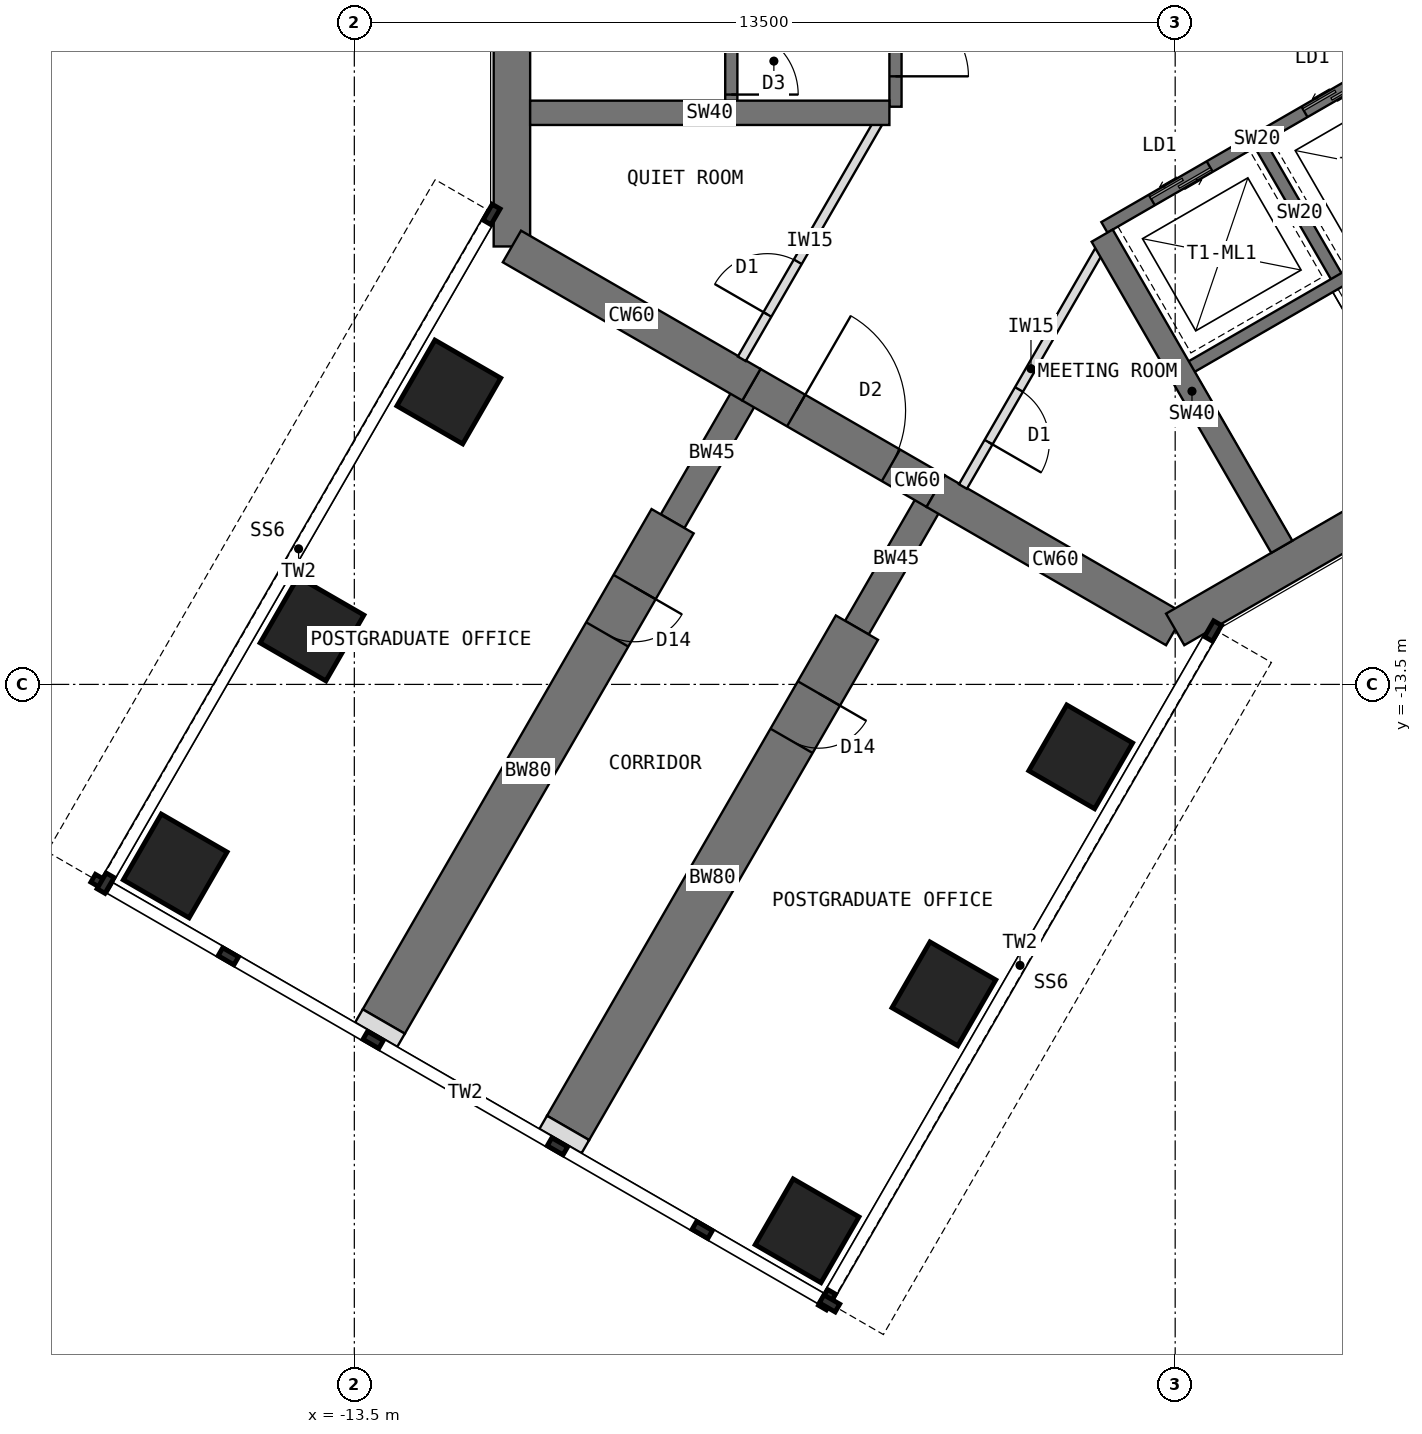
"""IFC4 building model, lengths in metres.
Left out: names, types, materials, properties, quantities, classifications, styles, units other than length and angle.
Written with IfcOpenShell. Run it as: python <this file> out.ifc"""

import sys

from ifc_helpers import new_model, si_unit, direction, frame, frame_2d, origin, origin_2d, place, context, subcontext, project, spatial, rectangle, extrude, element, fill, save


model = new_model("IFC4")
c1 = context("Model", 3, precision=1e-05, world=origin(), true_north=direction((0.0, 1.0)))
c2 = subcontext(c1, "Body", "Model", "MODEL_VIEW")
j1 = project(units=[si_unit("LENGTHUNIT", "METRE"), si_unit("PLANEANGLEUNIT", "RADIAN")], contexts=[c1])
p1 = place(None, origin())
s1 = spatial("IfcSite", under=j1, at=p1, CompositionType="ELEMENT")
p2 = place(p1, origin())
s2 = spatial("IfcBuilding", under=s1, at=p2, CompositionType="ELEMENT")
p3 = place(p2, frame((0.0, 0.0, 161.5)))
s3 = spatial("IfcBuildingStorey", under=s2, at=p3, CompositionType="ELEMENT", Elevation=161.5)
p4 = place(p3, frame((-10.908, 6.298, 0.0), z_axis=(0.0, 0.0, 1.0), x_axis=(0.0, -1.0, 0.0)))
e1 = element("IfcWall", 1, at=p4, inside=s3, PredefinedType="SHEAR", context=c2, shape_type="SweptSolid", body=[
    extrude(rectangle(XDim=12.596, YDim=0.6, at=frame_2d((6.298, 0.0))), origin(), (0.0, 0.0, 1.0), 4.0),
])
p5 = place(p3, frame((-10.908, -6.298, 0.0), z_axis=(0.0, 0.0, 1.0), x_axis=(0.866034513004, -0.499984222037, 0.0)))
e2 = element("IfcWall", 2, at=p5, inside=s3, PredefinedType="SHEAR", context=c2, shape_type="SweptSolid", body=[
    extrude(rectangle(XDim=4.548, YDim=0.6, at=frame_2d((2.274, 0.0))), origin(), (0.0, 0.0, 1.0), 4.0),
])
p6 = place(p3, frame((-6.97, -8.572, 0.0), z_axis=(0.0, 0.0, 1.0), x_axis=(0.866019471182, -0.500010275428, 0.0)))
e3 = element("IfcWall", 3, at=p6, inside=s3, PredefinedType="SHEAR", context=c2, shape_type="SweptSolid", body=[
    extrude(rectangle(XDim=3.5, YDim=0.6, at=frame_2d((1.75, 0.0))), origin(), (0.0, 0.0, 1.0), 4.0),
])
p7 = place(p6, frame((0.85, 0.0, 0.0)))
e4 = element("IfcOpeningElement", 4, at=p7, cuts=e3, PredefinedType="OPENING", context=c2, shape_type="SweptSolid", body=[
    extrude(rectangle(XDim=1.8, YDim=2.1, at=frame_2d((0.9, 1.05))), frame((0.0, 0.31, 0.0), z_axis=(0.0, -1.0, 0.0), x_axis=(1.0, 0.0, 0.0)), (0.0, 0.0, 1.0), 0.62),
])
p8 = place(p3, frame((-3.939, -10.322, 0.0), z_axis=(0.0, 0.0, 1.0), x_axis=(0.866011268655, -0.500024481964, 0.0)))
e5 = element("IfcWall", 5, at=p8, inside=s3, PredefinedType="SHEAR", context=c2, shape_type="SweptSolid", body=[
    extrude(rectangle(XDim=4.548, YDim=0.6, at=frame_2d((2.274, 0.0))), origin(), (0.0, 0.0, 1.0), 4.0),
])
p9 = place(p3, frame((0.0, -12.596, 0.0), z_axis=(0.0, 0.0, 1.0), x_axis=(0.866021940709, 0.500005998175, 0.0)))
e6 = element("IfcWall", 6, at=p9, inside=s3, PredefinedType="SHEAR", context=c2, shape_type="SweptSolid", body=[
    extrude(rectangle(XDim=12.596, YDim=0.6, at=frame_2d((6.298, 0.0))), origin(), (0.0, 0.0, 1.0), 4.0),
])
p10 = place(p3, frame((-3.939, -10.322, 0.0), z_axis=(0.0, 0.0, 1.0), x_axis=(-0.499918158782, -0.866072649678, 0.0)))
e7 = element("IfcWall", 7, at=p10, inside=s3, PredefinedType="SHEAR", context=c2, shape_type="SweptSolid", body=[
    extrude(rectangle(XDim=2.592, YDim=0.45, at=frame_2d((1.296, 0.0))), origin(), (0.0, 0.0, 1.0), 4.0),
])
p11 = place(p3, frame((-5.234, -12.566, 0.0), z_axis=(0.0, 0.0, 1.0), x_axis=(-0.499997557548, -0.86602681393, 0.0)))
e8 = element("IfcWall", 8, at=p11, inside=s3, PredefinedType="SHEAR", context=c2, shape_type="SweptSolid", body=[
    extrude(rectangle(XDim=9.5, YDim=0.8, at=frame_2d((4.75, 0.0))), origin(), (0.0, 0.0, 1.0), 4.0),
])
p12 = place(p11, frame((1.25, 0.0, 0.0)))
e9 = element("IfcOpeningElement", 9, at=p12, cuts=e8, PredefinedType="OPENING", context=c2, shape_type="SweptSolid", body=[
    extrude(rectangle(XDim=0.9, YDim=2.1, at=frame_2d((0.45, 1.05))), frame((0.0, 0.41, 0.0), z_axis=(0.0, -1.0, 0.0), x_axis=(1.0, 0.0, 0.0)), (0.0, 0.0, 1.0), 0.82),
])
p13 = place(p3, frame((-6.97, -8.572, 0.0), z_axis=(0.0, 0.0, 1.0), x_axis=(-0.499988811324, -0.866031863473, 0.0)))
e10 = element("IfcWall", 10, at=p13, inside=s3, PredefinedType="SHEAR", context=c2, shape_type="SweptSolid", body=[
    extrude(rectangle(XDim=2.592, YDim=0.45, at=frame_2d((1.296, 0.0))), origin(), (0.0, 0.0, 1.0), 4.0),
])
p14 = place(p3, frame((-8.266, -10.816, 0.0), z_axis=(0.0, 0.0, 1.0), x_axis=(-0.499997557548, -0.86602681393, 0.0)))
e11 = element("IfcWall", 11, at=p14, inside=s3, PredefinedType="SHEAR", context=c2, shape_type="SweptSolid", body=[
    extrude(rectangle(XDim=9.5, YDim=0.8, at=frame_2d((4.75, 0.0))), origin(), (0.0, 0.0, 1.0), 4.0),
])
p15 = place(p14, frame((1.25, 0.0, 0.0)))
e12 = element("IfcOpeningElement", 12, at=p15, cuts=e11, PredefinedType="OPENING", context=c2, shape_type="SweptSolid", body=[
    extrude(rectangle(XDim=0.9, YDim=2.1, at=frame_2d((0.45, 1.05))), frame((0.0, 0.41, 0.0), z_axis=(0.0, -1.0, 0.0), x_axis=(1.0, 0.0, 0.0)), (0.0, 0.0, 1.0), 0.82),
])
for number, where, z_axis, x_axis in (
    (13, (-1.554, -14.691, 0.0), (0.0, 0.0, 1.0), (0.5, 0.866, 0.0)),
    (14, (-11.946, -8.691, 0.0), (0.0, 0.0, 1.0), (0.5, 0.866, 0.0)),
    (15, (-3.804, -18.588, 0.0), (0.0, 0.0, 1.0), (0.5, 0.866, 0.0)),
    (16, (-14.196, -12.588, 0.0), (0.0, 0.0, 1.0), (0.5, 0.866, 0.0)),
    (17, (-6.054, -22.486, 0.0), (0.0, 0.0, 1.0), (0.5, 0.866, 0.0)),
    (18, (-16.446, -16.486, 0.0), (0.0, 0.0, 1.0), (0.5, 0.866, 0.0)),
):
    element("IfcColumn", number, at=place(p3, frame(where, z_axis=z_axis, x_axis=x_axis)), inside=s3, PredefinedType="COLUMN", context=c2, shape_type="SweptSolid", body=[
        extrude(rectangle(XDim=1.25, YDim=1.25, at=origin_2d()), origin(), (0.0, 0.0, 1.0), 4.0),
    ])
for number, where, z_axis, x_axis in (
    (19, (-9.984, -20.794, 0.0), (0.0, 0.0, 1.0), (-0.5, -0.866, 0.0)),
    (20, (-13.016, -19.044, 0.0), (0.0, 0.0, 1.0), (-0.5, -0.866, 0.0)),
):
    element("IfcWall", number, at=place(p3, frame(where, z_axis=z_axis, x_axis=x_axis)), inside=s3, PredefinedType="PARTITIONING", context=c2, shape_type="SweptSolid", body=[
        extrude(rectangle(XDim=0.25, YDim=0.8, at=frame_2d((0.125, 0.0))), origin(), (0.0, 0.0, 1.0), 3.7),
    ])
p16 = place(p3, frame((-4.6, 4.0, 0.0), z_axis=(0.0, 0.0, 1.0), x_axis=(0.0, -1.0, 0.0)))
e21 = element("IfcWall", 21, at=p16, inside=s3, PredefinedType="SHEAR", context=c2, shape_type="SweptSolid", body=[
    extrude(rectangle(XDim=8.0, YDim=0.2, at=frame_2d((4.0, 0.0))), origin(), (0.0, 0.0, 1.0), 4.0),
])
p17 = place(p16, frame((6.3, 0.0, 0.0)))
e22 = element("IfcOpeningElement", 22, at=p17, cuts=e21, PredefinedType="OPENING", context=c2, shape_type="SweptSolid", body=[
    extrude(rectangle(XDim=1.2, YDim=2.1, at=frame_2d((0.6, 1.05))), frame((0.0, 0.11, 0.0), z_axis=(0.0, -1.0, 0.0), x_axis=(1.0, 0.0, 0.0)), (0.0, 0.0, 1.0), 0.22),
])
p18 = place(p16, frame((0.9, 0.0, 0.0)))
e23 = element("IfcOpeningElement", 23, at=p18, cuts=e21, PredefinedType="OPENING", context=c2, shape_type="SweptSolid", body=[
    extrude(rectangle(XDim=1.1, YDim=2.2, at=frame_2d((0.55, 1.1))), frame((0.0, 0.11, 0.0), z_axis=(0.0, -1.0, 0.0), x_axis=(1.0, 0.0, 0.0)), (0.0, 0.0, 1.0), 0.22),
])
p19 = place(p3, frame((-7.3, 4.0, 0.0), z_axis=(0.0, 0.0, 1.0), x_axis=(0.0, -1.0, 0.0)))
e24 = element("IfcWall", 24, at=p19, inside=s3, PredefinedType="SHEAR", context=c2, shape_type="SweptSolid", body=[
    extrude(rectangle(XDim=8.0, YDim=0.2, at=frame_2d((4.0, 0.0))), origin(), (0.0, 0.0, 1.0), 4.0),
])
p20 = place(p19, frame((6.7, 0.0, 0.0)))
e25 = element("IfcOpeningElement", 25, at=p20, cuts=e24, PredefinedType="OPENING", context=c2, shape_type="SweptSolid", body=[
    extrude(rectangle(XDim=1.1, YDim=2.1, at=frame_2d((0.55, 1.05))), frame((0.0, 0.11, 0.0), z_axis=(0.0, -1.0, 0.0), x_axis=(1.0, 0.0, 0.0)), (0.0, 0.0, 1.0), 0.22),
])
p21 = place(p3, frame((-4.7, -4.1, 0.0), z_axis=(0.0, 0.0, 1.0), x_axis=(-1.0, 0.0, 0.0)))
e26 = element("IfcWall", 26, at=p21, inside=s3, PredefinedType="SHEAR", context=c2, shape_type="SweptSolid", body=[
    extrude(rectangle(XDim=5.908, YDim=0.4, at=frame_2d((2.954, 0.0))), origin(), (0.0, 0.0, 1.0), 4.0),
])
p22 = place(p3, frame((-1.164, -5.984, 0.0), z_axis=(0.0, 0.0, 1.0), x_axis=(0.866026010844, 0.49999894854, 0.0)))
e27 = element("IfcWall", 27, at=p22, inside=s3, PredefinedType="SHEAR", context=c2, shape_type="SweptSolid", body=[
    extrude(rectangle(XDim=8.0, YDim=0.2, at=frame_2d((4.0, 0.0))), origin(), (0.0, 0.0, 1.0), 4.0),
])
p23 = place(p22, frame((6.3, 0.0, 0.0)))
e28 = element("IfcOpeningElement", 28, at=p23, cuts=e27, PredefinedType="OPENING", context=c2, shape_type="SweptSolid", body=[
    extrude(rectangle(XDim=1.2, YDim=2.1, at=frame_2d((0.6, 1.05))), frame((0.0, 0.11, 0.0), z_axis=(0.0, -1.0, 0.0), x_axis=(1.0, 0.0, 0.0)), (0.0, 0.0, 1.0), 0.22),
])
p24 = place(p22, frame((0.9, 0.0, 0.0)))
e29 = element("IfcOpeningElement", 29, at=p24, cuts=e27, PredefinedType="OPENING", context=c2, shape_type="SweptSolid", body=[
    extrude(rectangle(XDim=1.1, YDim=2.2, at=frame_2d((0.55, 1.1))), frame((0.0, 0.11, 0.0), z_axis=(0.0, -1.0, 0.0), x_axis=(1.0, 0.0, 0.0)), (0.0, 0.0, 1.0), 0.22),
])
p25 = place(p22, frame((3.8, 0.0, 0.0)))
e30 = element("IfcOpeningElement", 30, at=p25, cuts=e27, PredefinedType="OPENING", context=c2, shape_type="SweptSolid", body=[
    extrude(rectangle(XDim=1.1, YDim=2.2, at=frame_2d((0.55, 1.1))), frame((0.0, 0.11, 0.0), z_axis=(0.0, -1.0, 0.0), x_axis=(1.0, 0.0, 0.0)), (0.0, 0.0, 1.0), 0.22),
])
p26 = place(p3, frame((1.397, -4.62, 0.0), z_axis=(0.0, 0.0, 1.0), x_axis=(0.499936506574, -0.866062058628, 0.0)))
e31 = element("IfcWall", 31, at=p26, inside=s3, PredefinedType="SHEAR", context=c2, shape_type="SweptSolid", body=[
    extrude(rectangle(XDim=2.6, YDim=0.2, at=frame_2d((1.3, 0.0))), origin(), (0.0, 0.0, 1.0), 4.0),
])
p27 = place(p3, frame((0.186, -8.322, 0.0), z_axis=(0.0, 0.0, 1.0), x_axis=(0.866026010844, 0.49999894854, 0.0)))
e32 = element("IfcWall", 32, at=p27, inside=s3, PredefinedType="SHEAR", context=c2, shape_type="SweptSolid", body=[
    extrude(rectangle(XDim=8.0, YDim=0.2, at=frame_2d((4.0, 0.0))), origin(), (0.0, 0.0, 1.0), 4.0),
])
p28 = place(p27, frame((6.7, 0.0, 0.0)))
e33 = element("IfcOpeningElement", 33, at=p28, cuts=e32, PredefinedType="OPENING", context=c2, shape_type="SweptSolid", body=[
    extrude(rectangle(XDim=1.1, YDim=2.1, at=frame_2d((0.55, 1.05))), frame((0.0, 0.11, 0.0), z_axis=(0.0, -1.0, 0.0), x_axis=(1.0, 0.0, 0.0)), (0.0, 0.0, 1.0), 0.22),
])
p29 = place(p3, frame((-1.201, -6.12, 0.0), z_axis=(0.0, 0.0, 1.0), x_axis=(0.49999668571, -0.866027317282, 0.0)))
e34 = element("IfcWall", 34, at=p29, inside=s3, PredefinedType="SHEAR", context=c2, shape_type="SweptSolid", body=[
    extrude(rectangle(XDim=5.908, YDim=0.4, at=frame_2d((2.954, 0.0))), origin(), (0.0, 0.0, 1.0), 4.0),
])
p30 = place(p3, frame((-1.253, -6.37, 0.0), z_axis=(0.0, 0.0, 1.0), x_axis=(-0.499999473313, -0.866025707867, 0.0)))
e35 = element("IfcWall", 35, at=p30, inside=s3, PredefinedType="PARTITIONING", context=c2, shape_type="SweptSolid", body=[
    extrude(rectangle(XDim=4.476, YDim=0.15, at=frame_2d((2.238, 0.0))), origin(), (0.0, 0.0, 1.0), 3.7),
])
p31 = place(p30, frame((2.633, 0.0, 0.0)))
e36 = element("IfcOpeningElement", 36, at=p31, cuts=e35, PredefinedType="OPENING", context=c2, shape_type="SweptSolid", body=[
    extrude(rectangle(XDim=1.0, YDim=2.1, at=frame_2d((0.5, 1.05))), frame((0.0, 0.085, 0.0), z_axis=(0.0, -1.0, 0.0), x_axis=(1.0, 0.0, 0.0)), (0.0, 0.0, 1.0), 0.17),
])
p32 = place(p3, frame((-7.128, -8.146, 0.0), z_axis=(0.0, 0.0, 1.0), x_axis=(0.499999473313, 0.866025707867, 0.0)))
e37 = element("IfcWall", 37, at=p32, inside=s3, PredefinedType="PARTITIONING", context=c2, shape_type="SweptSolid", body=[
    extrude(rectangle(XDim=4.476, YDim=0.15, at=frame_2d((2.238, 0.0))), origin(), (0.0, 0.0, 1.0), 3.7),
])
p33 = place(p32, frame((0.843, 0.0, 0.0)))
e38 = element("IfcOpeningElement", 38, at=p33, cuts=e37, PredefinedType="OPENING", context=c2, shape_type="SweptSolid", body=[
    extrude(rectangle(XDim=1.0, YDim=2.1, at=frame_2d((0.5, 1.05))), frame((0.0, 0.085, 0.0), z_axis=(0.0, -1.0, 0.0), x_axis=(1.0, 0.0, 0.0)), (0.0, 0.0, 1.0), 0.17),
])
p34 = place(p17, origin())
e39 = element("IfcDoor", 39, at=p34, inside=s3, OperationType="SINGLE_SWING_RIGHT", PredefinedType="DOOR", context=c2, shape_type="SweptSolid", body=[
    extrude(rectangle(XDim=1.2, YDim=2.1, at=frame_2d((0.6, 1.05))), frame((0.0, 0.025, 0.0), z_axis=(0.0, -1.0, 0.0), x_axis=(1.0, 0.0, 0.0)), (0.0, 0.0, 1.0), 0.05),
])
fill(e22, e39)
p35 = place(p20, origin())
e40 = element("IfcDoor", 40, at=p35, inside=s3, OperationType="SINGLE_SWING_RIGHT", PredefinedType="DOOR", context=c2, shape_type="SweptSolid", body=[
    extrude(rectangle(XDim=1.1, YDim=2.1, at=frame_2d((0.55, 1.05))), frame((0.0, 0.025, 0.0), z_axis=(0.0, -1.0, 0.0), x_axis=(1.0, 0.0, 0.0)), (0.0, 0.0, 1.0), 0.05),
])
fill(e25, e40)
p36 = place(p24, origin())
e41 = element("IfcDoor", 41, at=p36, inside=s3, OperationType="DOUBLE_DOOR_SLIDING", PredefinedType="DOOR", context=c2, shape_type="SweptSolid", body=[
    extrude(rectangle(XDim=1.1, YDim=2.2, at=frame_2d((0.55, 1.1))), frame((0.0, 0.025, 0.0), z_axis=(0.0, -1.0, 0.0), x_axis=(1.0, 0.0, 0.0)), (0.0, 0.0, 1.0), 0.05),
])
fill(e29, e41)
p37 = place(p25, origin())
e42 = element("IfcDoor", 42, at=p37, inside=s3, OperationType="DOUBLE_DOOR_SLIDING", PredefinedType="DOOR", context=c2, shape_type="SweptSolid", body=[
    extrude(rectangle(XDim=1.1, YDim=2.2, at=frame_2d((0.55, 1.1))), frame((0.0, 0.025, 0.0), z_axis=(0.0, -1.0, 0.0), x_axis=(1.0, 0.0, 0.0)), (0.0, 0.0, 1.0), 0.05),
])
fill(e30, e42)
p38 = place(p7, origin())
e43 = element("IfcDoor", 43, at=p38, inside=s3, OperationType="DOUBLE_DOOR_DOUBLE_SWING", PredefinedType="DOOR", context=c2, shape_type="SweptSolid", body=[
    extrude(rectangle(XDim=1.72, YDim=2.06, at=frame_2d((0.9, 1.03))), frame((0.0, 0.025, 0.0), z_axis=(0.0, -1.0, 0.0), x_axis=(1.0, 0.0, 0.0)), (0.0, 0.0, 1.0), 0.05),
    extrude(rectangle(XDim=0.04, YDim=2.1, at=frame_2d((0.02, 1.05))), frame((0.0, 0.3, 0.0), z_axis=(0.0, -1.0, 0.0), x_axis=(1.0, 0.0, 0.0)), (0.0, 0.0, 1.0), 0.6),
    extrude(rectangle(XDim=0.04, YDim=2.1, at=frame_2d((1.78, 1.05))), frame((0.0, 0.3, 0.0), z_axis=(0.0, -1.0, 0.0), x_axis=(1.0, 0.0, 0.0)), (0.0, 0.0, 1.0), 0.6),
    extrude(rectangle(XDim=1.72, YDim=0.04, at=frame_2d((0.9, 2.08))), frame((0.0, 0.3, 0.0), z_axis=(0.0, -1.0, 0.0), x_axis=(1.0, 0.0, 0.0)), (0.0, 0.0, 1.0), 0.6),
])
fill(e4, e43)
p39 = place(p33, origin())
e44 = element("IfcDoor", 44, at=p39, inside=s3, OperationType="SINGLE_SWING_LEFT", PredefinedType="DOOR", context=c2, shape_type="SweptSolid", body=[
    extrude(rectangle(XDim=1.0, YDim=2.1, at=frame_2d((0.5, 1.05))), frame((0.0, 0.025, 0.0), z_axis=(0.0, -1.0, 0.0), x_axis=(1.0, 0.0, 0.0)), (0.0, 0.0, 1.0), 0.05),
])
fill(e38, e44)
p40 = place(p31, origin())
e45 = element("IfcDoor", 45, at=p40, inside=s3, OperationType="SINGLE_SWING_RIGHT", PredefinedType="DOOR", context=c2, shape_type="SweptSolid", body=[
    extrude(rectangle(XDim=1.0, YDim=2.1, at=frame_2d((0.5, 1.05))), frame((0.0, 0.025, 0.0), z_axis=(0.0, -1.0, 0.0), x_axis=(1.0, 0.0, 0.0)), (0.0, 0.0, 1.0), 0.05),
])
fill(e36, e45)
p41 = place(p12, origin())
e46 = element("IfcDoor", 46, at=p41, inside=s3, OperationType="SINGLE_SWING_LEFT", PredefinedType="DOOR", context=c2, shape_type="SweptSolid", body=[
    extrude(rectangle(XDim=0.82, YDim=2.06, at=frame_2d((0.45, 1.03))), frame((0.0, 0.025, 0.0), z_axis=(0.0, -1.0, 0.0), x_axis=(1.0, 0.0, 0.0)), (0.0, 0.0, 1.0), 0.05),
    extrude(rectangle(XDim=0.04, YDim=2.1, at=frame_2d((0.02, 1.05))), frame((0.0, 0.4, 0.0), z_axis=(0.0, -1.0, 0.0), x_axis=(1.0, 0.0, 0.0)), (0.0, 0.0, 1.0), 0.8),
    extrude(rectangle(XDim=0.04, YDim=2.1, at=frame_2d((0.88, 1.05))), frame((0.0, 0.4, 0.0), z_axis=(0.0, -1.0, 0.0), x_axis=(1.0, 0.0, 0.0)), (0.0, 0.0, 1.0), 0.8),
    extrude(rectangle(XDim=0.82, YDim=0.04, at=frame_2d((0.45, 2.08))), frame((0.0, 0.4, 0.0), z_axis=(0.0, -1.0, 0.0), x_axis=(1.0, 0.0, 0.0)), (0.0, 0.0, 1.0), 0.8),
])
fill(e9, e46)
p42 = place(p15, origin())
e47 = element("IfcDoor", 47, at=p42, inside=s3, OperationType="SINGLE_SWING_LEFT", PredefinedType="DOOR", context=c2, shape_type="SweptSolid", body=[
    extrude(rectangle(XDim=0.82, YDim=2.06, at=frame_2d((0.45, 1.03))), frame((0.0, 0.025, 0.0), z_axis=(0.0, -1.0, 0.0), x_axis=(1.0, 0.0, 0.0)), (0.0, 0.0, 1.0), 0.05),
    extrude(rectangle(XDim=0.04, YDim=2.1, at=frame_2d((0.02, 1.05))), frame((0.0, 0.4, 0.0), z_axis=(0.0, -1.0, 0.0), x_axis=(1.0, 0.0, 0.0)), (0.0, 0.0, 1.0), 0.8),
    extrude(rectangle(XDim=0.04, YDim=2.1, at=frame_2d((0.88, 1.05))), frame((0.0, 0.4, 0.0), z_axis=(0.0, -1.0, 0.0), x_axis=(1.0, 0.0, 0.0)), (0.0, 0.0, 1.0), 0.8),
    extrude(rectangle(XDim=0.82, YDim=0.04, at=frame_2d((0.45, 2.08))), frame((0.0, 0.4, 0.0), z_axis=(0.0, -1.0, 0.0), x_axis=(1.0, 0.0, 0.0)), (0.0, 0.0, 1.0), 0.8),
])
fill(e12, e47)
save(model, sys.argv[1])
